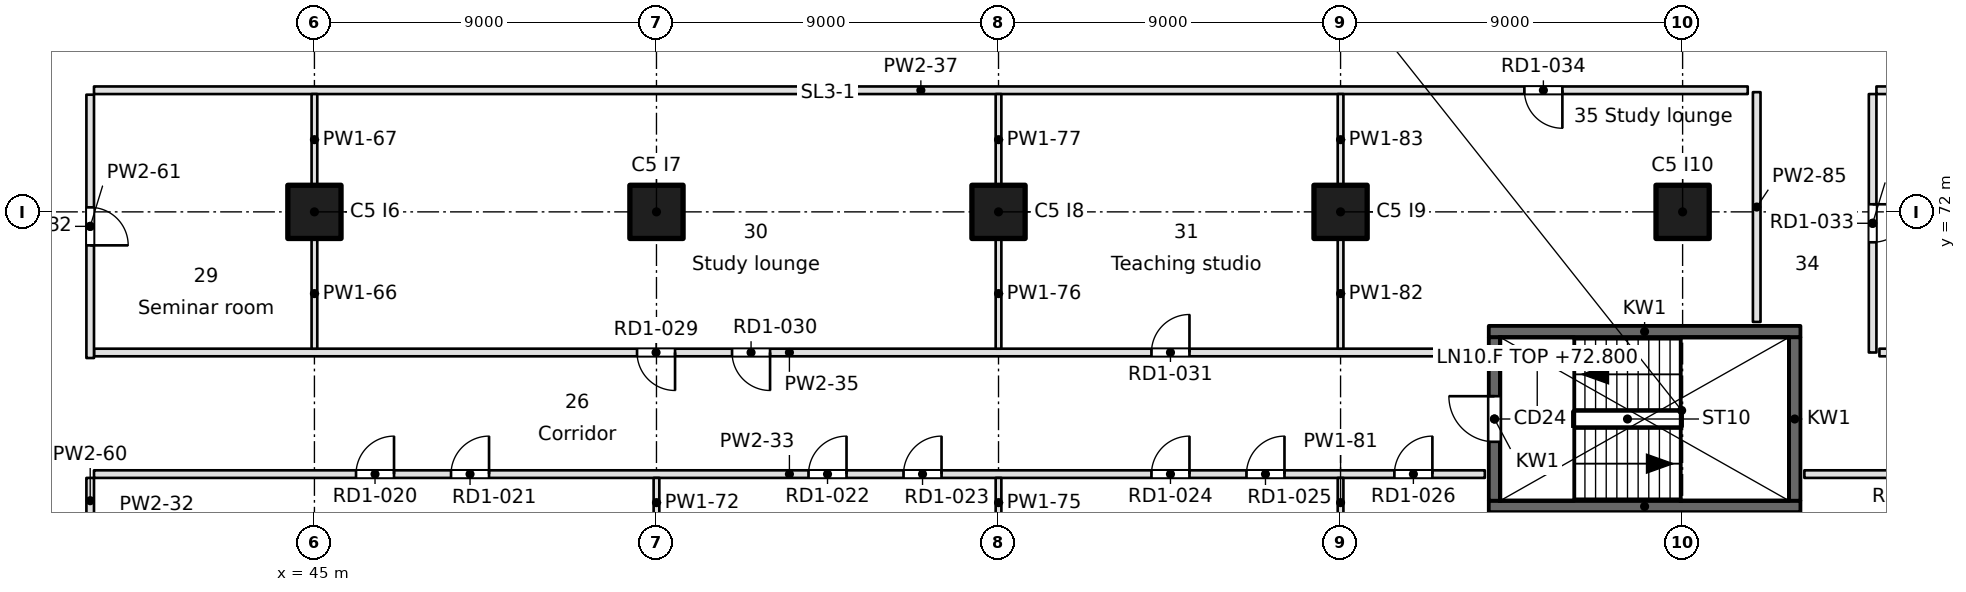
"""IFC4 building model, lengths in metres.
Left out: names, types, materials, properties, quantities, classifications, styles, units other than length and angle.
Written with IfcOpenShell. Run it as: python <this file> out.ifc"""

import sys

from ifc_helpers import new_model, si_unit, direction, frame, frame_2d, origin, origin_2d, place, context, subcontext, project, spatial, rectangle, extrude, element, fill, save


model = new_model("IFC4")
c1 = context("Model", 3, precision=1e-05, world=origin(), true_north=direction((0.0, 1.0)))
c2 = subcontext(c1, "Body", "Model", "MODEL_VIEW")
j1 = project(units=[si_unit("LENGTHUNIT", "METRE"), si_unit("PLANEANGLEUNIT", "RADIAN")], contexts=[c1])
p1 = place(None, origin())
s1 = spatial("IfcSite", under=j1, at=p1, CompositionType="ELEMENT")
p2 = place(p1, origin())
s2 = spatial("IfcBuilding", under=s1, at=p2, CompositionType="ELEMENT")
p3 = place(p2, frame((0.0, 0.0, 72.8)))
s3 = spatial("IfcBuildingStorey", under=s2, at=p3, CompositionType="ELEMENT", Elevation=72.8)
for number, where, z_axis, x_axis in (
    (1, (45.0, 72.0, 0.0), (0.0, 0.0, 1.0), (1.0, 0.0, 0.0)),
    (2, (54.0, 72.0, 0.0), (0.0, 0.0, 1.0), (1.0, 0.0, 0.0)),
    (3, (63.0, 72.0, 0.0), (0.0, 0.0, 1.0), (1.0, 0.0, 0.0)),
    (4, (72.0, 72.0, 0.0), (0.0, 0.0, 1.0), (1.0, 0.0, 0.0)),
    (5, (81.0, 72.0, 0.0), (0.0, 0.0, 1.0), (1.0, 0.0, 0.0)),
):
    element("IfcColumn", number, at=place(p3, frame(where, z_axis=z_axis, x_axis=x_axis)), inside=s3, PredefinedType="COLUMN", context=c2, shape_type="SweptSolid", body=[
        extrude(rectangle(XDim=1.4, YDim=1.4, at=origin_2d()), origin(), (0.0, 0.0, 1.0), 3.7),
    ])
for number, where, z_axis, x_axis in (
    (6, (75.9, 64.25, -0.4), (0.0, 0.0, 1.0), (1.0, 0.0, 0.0)),
    (7, (75.9, 68.85, -0.4), (0.0, 0.0, 1.0), (1.0, 0.0, 0.0)),
):
    element("IfcWall", number, at=place(p3, frame(where, z_axis=z_axis, x_axis=x_axis)), inside=s3, PredefinedType="SOLIDWALL", context=c2, shape_type="SweptSolid", body=[
        extrude(rectangle(XDim=8.2, YDim=0.3, at=frame_2d((4.1, 0.0))), origin(), (0.0, 0.0, 1.0), 3.7),
    ])
p4 = place(p3, frame((76.05, 64.4, -0.4), z_axis=(0.0, 0.0, 1.0), x_axis=(0.0, 1.0, 0.0)))
e8 = element("IfcWall", 8, at=p4, inside=s3, PredefinedType="SOLIDWALL", context=c2, shape_type="SweptSolid", body=[
    extrude(rectangle(XDim=4.3, YDim=0.3, at=frame_2d((2.15, 0.0))), origin(), (0.0, 0.0, 1.0), 3.7),
])
p5 = place(p4, frame((1.55, 0.0, 0.4)))
e9 = element("IfcOpeningElement", 9, at=p5, cuts=e8, PredefinedType="OPENING", context=c2, shape_type="SweptSolid", body=[
    extrude(rectangle(XDim=1.2, YDim=2.1, at=frame_2d((0.6, 1.05))), frame((0.0, 0.15, 0.0), z_axis=(0.0, -1.0, 0.0), x_axis=(1.0, 0.0, 0.0)), (0.0, 0.0, 1.0), 0.3),
])
p6 = place(p3, frame((83.95, 64.4, -0.4), z_axis=(0.0, 0.0, 1.0), x_axis=(0.0, 1.0, 0.0)))
e10 = element("IfcWall", 10, at=p6, inside=s3, PredefinedType="SOLIDWALL", context=c2, shape_type="SweptSolid", body=[
    extrude(rectangle(XDim=4.3, YDim=0.3, at=frame_2d((2.15, 0.0))), origin(), (0.0, 0.0, 1.0), 3.7),
])
p7 = place(p3, frame((75.796, 65.1, 0.0), z_axis=(0.0, 0.0, 1.0), x_axis=(-1.0, 0.0, 0.0)))
e11 = element("IfcWall", 11, at=p7, inside=s3, PredefinedType="PARTITIONING", context=c2, shape_type="SweptSolid", body=[
    extrude(rectangle(XDim=36.596, YDim=0.2, at=frame_2d((18.298, 0.0))), origin(), (0.0, 0.0, 1.0), 3.3),
])
p8 = place(p7, frame((28.702, 0.0, 0.0)))
e12 = element("IfcOpeningElement", 12, at=p8, cuts=e11, PredefinedType="OPENING", context=c2, shape_type="SweptSolid", body=[
    extrude(rectangle(XDim=1.0, YDim=2.1, at=frame_2d((0.5, 1.05))), frame((0.0, 0.1, 0.0), z_axis=(0.0, -1.0, 0.0), x_axis=(1.0, 0.0, 0.0)), (0.0, 0.0, 1.0), 0.2),
])
p9 = place(p7, frame((26.202, 0.0, 0.0)))
e13 = element("IfcOpeningElement", 13, at=p9, cuts=e11, PredefinedType="OPENING", context=c2, shape_type="SweptSolid", body=[
    extrude(rectangle(XDim=1.0, YDim=2.1, at=frame_2d((0.5, 1.05))), frame((0.0, 0.1, 0.0), z_axis=(0.0, -1.0, 0.0), x_axis=(1.0, 0.0, 0.0)), (0.0, 0.0, 1.0), 0.2),
])
p10 = place(p7, frame((16.795, 0.0, 0.0)))
e14 = element("IfcOpeningElement", 14, at=p10, cuts=e11, PredefinedType="OPENING", context=c2, shape_type="SweptSolid", body=[
    extrude(rectangle(XDim=1.0, YDim=2.1, at=frame_2d((0.5, 1.05))), frame((0.0, 0.1, 0.0), z_axis=(0.0, -1.0, 0.0), x_axis=(1.0, 0.0, 0.0)), (0.0, 0.0, 1.0), 0.2),
])
p11 = place(p7, frame((14.295, 0.0, 0.0)))
e15 = element("IfcOpeningElement", 15, at=p11, cuts=e11, PredefinedType="OPENING", context=c2, shape_type="SweptSolid", body=[
    extrude(rectangle(XDim=1.0, YDim=2.1, at=frame_2d((0.5, 1.05))), frame((0.0, 0.1, 0.0), z_axis=(0.0, -1.0, 0.0), x_axis=(1.0, 0.0, 0.0)), (0.0, 0.0, 1.0), 0.2),
])
p12 = place(p7, frame((7.772, 0.0, 0.0)))
e16 = element("IfcOpeningElement", 16, at=p12, cuts=e11, PredefinedType="OPENING", context=c2, shape_type="SweptSolid", body=[
    extrude(rectangle(XDim=1.0, YDim=2.1, at=frame_2d((0.5, 1.05))), frame((0.0, 0.1, 0.0), z_axis=(0.0, -1.0, 0.0), x_axis=(1.0, 0.0, 0.0)), (0.0, 0.0, 1.0), 0.2),
])
p13 = place(p7, frame((5.272, 0.0, 0.0)))
e17 = element("IfcOpeningElement", 17, at=p13, cuts=e11, PredefinedType="OPENING", context=c2, shape_type="SweptSolid", body=[
    extrude(rectangle(XDim=1.0, YDim=2.1, at=frame_2d((0.5, 1.05))), frame((0.0, 0.1, 0.0), z_axis=(0.0, -1.0, 0.0), x_axis=(1.0, 0.0, 0.0)), (0.0, 0.0, 1.0), 0.2),
])
p14 = place(p7, frame((1.38, 0.0, 0.0)))
e18 = element("IfcOpeningElement", 18, at=p14, cuts=e11, PredefinedType="OPENING", context=c2, shape_type="SweptSolid", body=[
    extrude(rectangle(XDim=1.0, YDim=2.1, at=frame_2d((0.5, 1.05))), frame((0.0, 0.1, 0.0), z_axis=(0.0, -1.0, 0.0), x_axis=(1.0, 0.0, 0.0)), (0.0, 0.0, 1.0), 0.2),
])
p15 = place(p3, frame((96.545, 65.1, 0.0), z_axis=(0.0, 0.0, 1.0), x_axis=(-1.0, 0.0, 0.0)))
e19 = element("IfcWall", 19, at=p15, inside=s3, PredefinedType="PARTITIONING", context=c2, shape_type="SweptSolid", body=[
    extrude(rectangle(XDim=12.341, YDim=0.2, at=frame_2d((6.17, 0.0))), origin(), (0.0, 0.0, 1.0), 3.3),
])
p16 = place(p15, frame((8.945, 0.0, 0.0)))
e20 = element("IfcOpeningElement", 20, at=p16, cuts=e19, PredefinedType="OPENING", context=c2, shape_type="SweptSolid", body=[
    extrude(rectangle(XDim=1.0, YDim=2.1, at=frame_2d((0.5, 1.05))), frame((0.0, 0.1, 0.0), z_axis=(0.0, -1.0, 0.0), x_axis=(1.0, 0.0, 0.0)), (0.0, 0.0, 1.0), 0.2),
])
p17 = place(p15, frame((2.774, 0.0, 0.0)))
e21 = element("IfcOpeningElement", 21, at=p17, cuts=e19, PredefinedType="OPENING", context=c2, shape_type="SweptSolid", body=[
    extrude(rectangle(XDim=1.0, YDim=2.1, at=frame_2d((0.5, 1.05))), frame((0.0, 0.1, 0.0), z_axis=(0.0, -1.0, 0.0), x_axis=(1.0, 0.0, 0.0)), (0.0, 0.0, 1.0), 0.2),
])
p18 = place(p3, frame((39.2, 68.3, 0.0), z_axis=(0.0, 0.0, 1.0), x_axis=(1.0, 0.0, 0.0)))
e22 = element("IfcWall", 22, at=p18, inside=s3, PredefinedType="PARTITIONING", context=c2, shape_type="SweptSolid", body=[
    extrude(rectangle(XDim=36.596, YDim=0.2, at=frame_2d((18.298, 0.0))), origin(), (0.0, 0.0, 1.0), 3.3),
])
p19 = place(p18, frame((14.289, 0.0, 0.0)))
e23 = element("IfcOpeningElement", 23, at=p19, cuts=e22, PredefinedType="OPENING", context=c2, shape_type="SweptSolid", body=[
    extrude(rectangle(XDim=1.0, YDim=2.1, at=frame_2d((0.5, 1.05))), frame((0.0, 0.1, 0.0), z_axis=(0.0, -1.0, 0.0), x_axis=(1.0, 0.0, 0.0)), (0.0, 0.0, 1.0), 0.2),
])
p20 = place(p18, frame((16.789, 0.0, 0.0)))
e24 = element("IfcOpeningElement", 24, at=p20, cuts=e22, PredefinedType="OPENING", context=c2, shape_type="SweptSolid", body=[
    extrude(rectangle(XDim=1.0, YDim=2.1, at=frame_2d((0.5, 1.05))), frame((0.0, 0.1, 0.0), z_axis=(0.0, -1.0, 0.0), x_axis=(1.0, 0.0, 0.0)), (0.0, 0.0, 1.0), 0.2),
])
p21 = place(p18, frame((27.824, 0.0, 0.0)))
e25 = element("IfcOpeningElement", 25, at=p21, cuts=e22, PredefinedType="OPENING", context=c2, shape_type="SweptSolid", body=[
    extrude(rectangle(XDim=1.0, YDim=2.1, at=frame_2d((0.5, 1.05))), frame((0.0, 0.1, 0.0), z_axis=(0.0, -1.0, 0.0), x_axis=(1.0, 0.0, 0.0)), (0.0, 0.0, 1.0), 0.2),
])
p22 = place(p3, frame((86.178, 68.3, 0.0), z_axis=(0.0, 0.0, 1.0), x_axis=(1.0, 0.0, 0.0)))
e26 = element("IfcWall", 26, at=p22, inside=s3, PredefinedType="PARTITIONING", context=c2, shape_type="SweptSolid", body=[
    extrude(rectangle(XDim=10.366, YDim=0.2, at=frame_2d((5.183, 0.0))), origin(), (0.0, 0.0, 1.0), 3.3),
])
p23 = place(p3, frame((82.713, 75.2, 0.0), z_axis=(0.0, 0.0, 1.0), x_axis=(-1.0, 0.0, 0.0)))
e27 = element("IfcWall", 27, at=p23, inside=s3, PredefinedType="PARTITIONING", context=c2, shape_type="SweptSolid", body=[
    extrude(rectangle(XDim=43.513, YDim=0.2, at=frame_2d((21.757, 0.0))), origin(), (0.0, 0.0, 1.0), 3.3),
])
p24 = place(p23, frame((4.877, 0.0, 0.0)))
e28 = element("IfcOpeningElement", 28, at=p24, cuts=e27, PredefinedType="OPENING", context=c2, shape_type="SweptSolid", body=[
    extrude(rectangle(XDim=1.0, YDim=2.1, at=frame_2d((0.5, 1.05))), frame((0.0, 0.1, 0.0), z_axis=(0.0, -1.0, 0.0), x_axis=(1.0, 0.0, 0.0)), (0.0, 0.0, 1.0), 0.2),
])
p25 = place(p3, frame((96.545, 75.2, 0.0), z_axis=(0.0, 0.0, 1.0), x_axis=(-1.0, 0.0, 0.0)))
e29 = element("IfcWall", 29, at=p25, inside=s3, PredefinedType="PARTITIONING", context=c2, shape_type="SweptSolid", body=[
    extrude(rectangle(XDim=10.445, YDim=0.2, at=frame_2d((5.222, 0.0))), origin(), (0.0, 0.0, 1.0), 3.3),
])
p26 = place(p25, frame((2.685, 0.0, 0.0)))
e30 = element("IfcOpeningElement", 30, at=p26, cuts=e29, PredefinedType="OPENING", context=c2, shape_type="SweptSolid", body=[
    extrude(rectangle(XDim=1.0, YDim=2.1, at=frame_2d((0.5, 1.05))), frame((0.0, 0.1, 0.0), z_axis=(0.0, -1.0, 0.0), x_axis=(1.0, 0.0, 0.0)), (0.0, 0.0, 1.0), 0.2),
])
p27 = place(p3, frame((39.1, 65.0, 0.0), z_axis=(0.0, 0.0, 1.0), x_axis=(0.0, -1.0, 0.0)))
e31 = element("IfcWall", 31, at=p27, inside=s3, PredefinedType="PARTITIONING", context=c2, shape_type="SweptSolid", body=[
    extrude(rectangle(XDim=1.2, YDim=0.2, at=frame_2d((0.6, 0.0))), origin(), (0.0, 0.0, 1.0), 3.3),
])
p28 = place(p3, frame((39.1, 75.083, 0.0), z_axis=(0.0, 0.0, 1.0), x_axis=(0.0, -1.0, 0.0)))
e32 = element("IfcWall", 32, at=p28, inside=s3, PredefinedType="PARTITIONING", context=c2, shape_type="SweptSolid", body=[
    extrude(rectangle(XDim=6.929, YDim=0.2, at=frame_2d((3.465, 0.0))), origin(), (0.0, 0.0, 1.0), 3.3),
])
p29 = place(p28, frame((2.965, 0.0, 0.0)))
e33 = element("IfcOpeningElement", 33, at=p29, cuts=e32, PredefinedType="OPENING", context=c2, shape_type="SweptSolid", body=[
    extrude(rectangle(XDim=1.0, YDim=2.1, at=frame_2d((0.5, 1.05))), frame((0.0, 0.1, 0.0), z_axis=(0.0, -1.0, 0.0), x_axis=(1.0, 0.0, 0.0)), (0.0, 0.0, 1.0), 0.2),
])
p30 = place(p3, frame((45.0, 71.3, 0.0), z_axis=(0.0, 0.0, 1.0), x_axis=(0.0, -1.0, 0.0)))
e34 = element("IfcWall", 34, at=p30, inside=s3, PredefinedType="PARTITIONING", context=c2, shape_type="SweptSolid", body=[
    extrude(rectangle(XDim=2.9, YDim=0.15, at=frame_2d((1.45, 0.0))), origin(), (0.0, 0.0, 1.0), 3.3),
])
p31 = place(p3, frame((45.0, 75.1, 0.0), z_axis=(0.0, 0.0, 1.0), x_axis=(0.0, -1.0, 0.0)))
e35 = element("IfcWall", 35, at=p31, inside=s3, PredefinedType="PARTITIONING", context=c2, shape_type="SweptSolid", body=[
    extrude(rectangle(XDim=2.4, YDim=0.15, at=frame_2d((1.2, 0.0))), origin(), (0.0, 0.0, 1.0), 3.3),
])
for number, where, z_axis, x_axis in (
    (36, (54.0, 65.0, 0.0), (0.0, 0.0, 1.0), (0.0, -1.0, 0.0)),
    (37, (63.0, 65.0, 0.0), (0.0, 0.0, 1.0), (0.0, -1.0, 0.0)),
):
    element("IfcWall", number, at=place(p3, frame(where, z_axis=z_axis, x_axis=x_axis)), inside=s3, PredefinedType="PARTITIONING", context=c2, shape_type="SweptSolid", body=[
        extrude(rectangle(XDim=1.3, YDim=0.15, at=frame_2d((0.65, 0.0))), origin(), (0.0, 0.0, 1.0), 3.3),
    ])
p32 = place(p3, frame((63.0, 71.3, 0.0), z_axis=(0.0, 0.0, 1.0), x_axis=(0.0, -1.0, 0.0)))
e38 = element("IfcWall", 38, at=p32, inside=s3, PredefinedType="PARTITIONING", context=c2, shape_type="SweptSolid", body=[
    extrude(rectangle(XDim=2.9, YDim=0.15, at=frame_2d((1.45, 0.0))), origin(), (0.0, 0.0, 1.0), 3.3),
])
p33 = place(p3, frame((63.0, 75.1, 0.0), z_axis=(0.0, 0.0, 1.0), x_axis=(0.0, -1.0, 0.0)))
e39 = element("IfcWall", 39, at=p33, inside=s3, PredefinedType="PARTITIONING", context=c2, shape_type="SweptSolid", body=[
    extrude(rectangle(XDim=2.4, YDim=0.15, at=frame_2d((1.2, 0.0))), origin(), (0.0, 0.0, 1.0), 3.3),
])
p34 = place(p3, frame((72.0, 65.0, 0.0), z_axis=(0.0, 0.0, 1.0), x_axis=(0.0, -1.0, 0.0)))
e40 = element("IfcWall", 40, at=p34, inside=s3, PredefinedType="PARTITIONING", context=c2, shape_type="SweptSolid", body=[
    extrude(rectangle(XDim=1.3, YDim=0.15, at=frame_2d((0.65, 0.0))), origin(), (0.0, 0.0, 1.0), 3.3),
])
p35 = place(p3, frame((72.0, 71.3, 0.0), z_axis=(0.0, 0.0, 1.0), x_axis=(0.0, -1.0, 0.0)))
e41 = element("IfcWall", 41, at=p35, inside=s3, PredefinedType="PARTITIONING", context=c2, shape_type="SweptSolid", body=[
    extrude(rectangle(XDim=2.9, YDim=0.15, at=frame_2d((1.45, 0.0))), origin(), (0.0, 0.0, 1.0), 3.3),
])
p36 = place(p3, frame((72.0, 75.1, 0.0), z_axis=(0.0, 0.0, 1.0), x_axis=(0.0, -1.0, 0.0)))
e42 = element("IfcWall", 42, at=p36, inside=s3, PredefinedType="PARTITIONING", context=c2, shape_type="SweptSolid", body=[
    extrude(rectangle(XDim=2.4, YDim=0.15, at=frame_2d((1.2, 0.0))), origin(), (0.0, 0.0, 1.0), 3.3),
])
p37 = place(p3, frame((82.95, 69.104, 0.0), z_axis=(0.0, 0.0, 1.0), x_axis=(0.0, 1.0, 0.0)))
e43 = element("IfcWall", 43, at=p37, inside=s3, PredefinedType="PARTITIONING", context=c2, shape_type="SweptSolid", body=[
    extrude(rectangle(XDim=6.046, YDim=0.2, at=frame_2d((3.023, 0.0))), origin(), (0.0, 0.0, 1.0), 3.3),
])
p38 = place(p3, frame((86.0, 75.1, 0.0), z_axis=(0.0, 0.0, 1.0), x_axis=(0.0, -1.0, 0.0)))
e44 = element("IfcWall", 44, at=p38, inside=s3, PredefinedType="PARTITIONING", context=c2, shape_type="SweptSolid", body=[
    extrude(rectangle(XDim=6.8, YDim=0.2, at=frame_2d((3.4, 0.0))), origin(), (0.0, 0.0, 1.0), 3.3),
])
p39 = place(p38, frame((2.9, 0.0, 0.0)))
e45 = element("IfcOpeningElement", 45, at=p39, cuts=e44, PredefinedType="OPENING", context=c2, shape_type="SweptSolid", body=[
    extrude(rectangle(XDim=1.0, YDim=2.1, at=frame_2d((0.5, 1.05))), frame((0.0, 0.1, 0.0), z_axis=(0.0, -1.0, 0.0), x_axis=(1.0, 0.0, 0.0)), (0.0, 0.0, 1.0), 0.2),
])
p40 = place(p5, origin())
e46 = element("IfcDoor", 46, at=p40, inside=s3, OperationType="SINGLE_SWING_RIGHT", PredefinedType="DOOR", context=c2, shape_type="SweptSolid", body=[
    extrude(rectangle(XDim=1.2, YDim=2.1, at=frame_2d((0.6, 1.05))), frame((0.0, 0.025, 0.0), z_axis=(0.0, -1.0, 0.0), x_axis=(1.0, 0.0, 0.0)), (0.0, 0.0, 1.0), 0.05),
])
fill(e9, e46)
p41 = place(p8, frame((1.0, 0.0, 0.0), z_axis=(0.0, 0.0, 1.0), x_axis=(-1.0, 0.0, 0.0)))
e47 = element("IfcDoor", 47, at=p41, inside=s3, OperationType="SINGLE_SWING_RIGHT", PredefinedType="DOOR", context=c2, shape_type="SweptSolid", body=[
    extrude(rectangle(XDim=1.0, YDim=2.1, at=frame_2d((0.5, 1.05))), frame((0.0, 0.025, 0.0), z_axis=(0.0, -1.0, 0.0), x_axis=(1.0, 0.0, 0.0)), (0.0, 0.0, 1.0), 0.05),
])
fill(e12, e47)
p42 = place(p9, frame((1.0, 0.0, 0.0), z_axis=(0.0, 0.0, 1.0), x_axis=(-1.0, 0.0, 0.0)))
e48 = element("IfcDoor", 48, at=p42, inside=s3, OperationType="SINGLE_SWING_RIGHT", PredefinedType="DOOR", context=c2, shape_type="SweptSolid", body=[
    extrude(rectangle(XDim=1.0, YDim=2.1, at=frame_2d((0.5, 1.05))), frame((0.0, 0.025, 0.0), z_axis=(0.0, -1.0, 0.0), x_axis=(1.0, 0.0, 0.0)), (0.0, 0.0, 1.0), 0.05),
])
fill(e13, e48)
p43 = place(p10, frame((1.0, 0.0, 0.0), z_axis=(0.0, 0.0, 1.0), x_axis=(-1.0, 0.0, 0.0)))
e49 = element("IfcDoor", 49, at=p43, inside=s3, OperationType="SINGLE_SWING_RIGHT", PredefinedType="DOOR", context=c2, shape_type="SweptSolid", body=[
    extrude(rectangle(XDim=1.0, YDim=2.1, at=frame_2d((0.5, 1.05))), frame((0.0, 0.025, 0.0), z_axis=(0.0, -1.0, 0.0), x_axis=(1.0, 0.0, 0.0)), (0.0, 0.0, 1.0), 0.05),
])
fill(e14, e49)
p44 = place(p11, frame((1.0, 0.0, 0.0), z_axis=(0.0, 0.0, 1.0), x_axis=(-1.0, 0.0, 0.0)))
e50 = element("IfcDoor", 50, at=p44, inside=s3, OperationType="SINGLE_SWING_RIGHT", PredefinedType="DOOR", context=c2, shape_type="SweptSolid", body=[
    extrude(rectangle(XDim=1.0, YDim=2.1, at=frame_2d((0.5, 1.05))), frame((0.0, 0.025, 0.0), z_axis=(0.0, -1.0, 0.0), x_axis=(1.0, 0.0, 0.0)), (0.0, 0.0, 1.0), 0.05),
])
fill(e15, e50)
p45 = place(p12, frame((1.0, 0.0, 0.0), z_axis=(0.0, 0.0, 1.0), x_axis=(-1.0, 0.0, 0.0)))
e51 = element("IfcDoor", 51, at=p45, inside=s3, OperationType="SINGLE_SWING_RIGHT", PredefinedType="DOOR", context=c2, shape_type="SweptSolid", body=[
    extrude(rectangle(XDim=1.0, YDim=2.1, at=frame_2d((0.5, 1.05))), frame((0.0, 0.025, 0.0), z_axis=(0.0, -1.0, 0.0), x_axis=(1.0, 0.0, 0.0)), (0.0, 0.0, 1.0), 0.05),
])
fill(e16, e51)
p46 = place(p13, frame((1.0, 0.0, 0.0), z_axis=(0.0, 0.0, 1.0), x_axis=(-1.0, 0.0, 0.0)))
e52 = element("IfcDoor", 52, at=p46, inside=s3, OperationType="SINGLE_SWING_RIGHT", PredefinedType="DOOR", context=c2, shape_type="SweptSolid", body=[
    extrude(rectangle(XDim=1.0, YDim=2.1, at=frame_2d((0.5, 1.05))), frame((0.0, 0.025, 0.0), z_axis=(0.0, -1.0, 0.0), x_axis=(1.0, 0.0, 0.0)), (0.0, 0.0, 1.0), 0.05),
])
fill(e17, e52)
p47 = place(p14, frame((1.0, 0.0, 0.0), z_axis=(0.0, 0.0, 1.0), x_axis=(-1.0, 0.0, 0.0)))
e53 = element("IfcDoor", 53, at=p47, inside=s3, OperationType="SINGLE_SWING_RIGHT", PredefinedType="DOOR", context=c2, shape_type="SweptSolid", body=[
    extrude(rectangle(XDim=1.0, YDim=2.1, at=frame_2d((0.5, 1.05))), frame((0.0, 0.025, 0.0), z_axis=(0.0, -1.0, 0.0), x_axis=(1.0, 0.0, 0.0)), (0.0, 0.0, 1.0), 0.05),
])
fill(e18, e53)
p48 = place(p19, frame((1.0, 0.0, 0.0), z_axis=(0.0, 0.0, 1.0), x_axis=(-1.0, 0.0, 0.0)))
e54 = element("IfcDoor", 54, at=p48, inside=s3, OperationType="SINGLE_SWING_LEFT", PredefinedType="DOOR", context=c2, shape_type="SweptSolid", body=[
    extrude(rectangle(XDim=1.0, YDim=2.1, at=frame_2d((0.5, 1.05))), frame((0.0, 0.025, 0.0), z_axis=(0.0, -1.0, 0.0), x_axis=(1.0, 0.0, 0.0)), (0.0, 0.0, 1.0), 0.05),
])
fill(e23, e54)
p49 = place(p20, frame((1.0, 0.0, 0.0), z_axis=(0.0, 0.0, 1.0), x_axis=(-1.0, 0.0, 0.0)))
e55 = element("IfcDoor", 55, at=p49, inside=s3, OperationType="SINGLE_SWING_LEFT", PredefinedType="DOOR", context=c2, shape_type="SweptSolid", body=[
    extrude(rectangle(XDim=1.0, YDim=2.1, at=frame_2d((0.5, 1.05))), frame((0.0, 0.025, 0.0), z_axis=(0.0, -1.0, 0.0), x_axis=(1.0, 0.0, 0.0)), (0.0, 0.0, 1.0), 0.05),
])
fill(e24, e55)
p50 = place(p21, origin())
e56 = element("IfcDoor", 56, at=p50, inside=s3, OperationType="SINGLE_SWING_RIGHT", PredefinedType="DOOR", context=c2, shape_type="SweptSolid", body=[
    extrude(rectangle(XDim=1.0, YDim=2.1, at=frame_2d((0.5, 1.05))), frame((0.0, 0.025, 0.0), z_axis=(0.0, -1.0, 0.0), x_axis=(1.0, 0.0, 0.0)), (0.0, 0.0, 1.0), 0.05),
])
fill(e25, e56)
p51 = place(p29, origin())
e57 = element("IfcDoor", 57, at=p51, inside=s3, OperationType="SINGLE_SWING_RIGHT", PredefinedType="DOOR", context=c2, shape_type="SweptSolid", body=[
    extrude(rectangle(XDim=1.0, YDim=2.1, at=frame_2d((0.5, 1.05))), frame((0.0, 0.025, 0.0), z_axis=(0.0, -1.0, 0.0), x_axis=(1.0, 0.0, 0.0)), (0.0, 0.0, 1.0), 0.05),
])
fill(e33, e57)
p52 = place(p39, origin())
e58 = element("IfcDoor", 58, at=p52, inside=s3, OperationType="SINGLE_SWING_LEFT", PredefinedType="DOOR", context=c2, shape_type="SweptSolid", body=[
    extrude(rectangle(XDim=1.0, YDim=2.1, at=frame_2d((0.5, 1.05))), frame((0.0, 0.025, 0.0), z_axis=(0.0, -1.0, 0.0), x_axis=(1.0, 0.0, 0.0)), (0.0, 0.0, 1.0), 0.05),
])
fill(e45, e58)
p53 = place(p24, origin())
e59 = element("IfcDoor", 59, at=p53, inside=s3, OperationType="SINGLE_SWING_LEFT", PredefinedType="DOOR", context=c2, shape_type="SweptSolid", body=[
    extrude(rectangle(XDim=1.0, YDim=2.1, at=frame_2d((0.5, 1.05))), frame((0.0, 0.025, 0.0), z_axis=(0.0, -1.0, 0.0), x_axis=(1.0, 0.0, 0.0)), (0.0, 0.0, 1.0), 0.05),
])
fill(e28, e59)
save(model, sys.argv[1])
